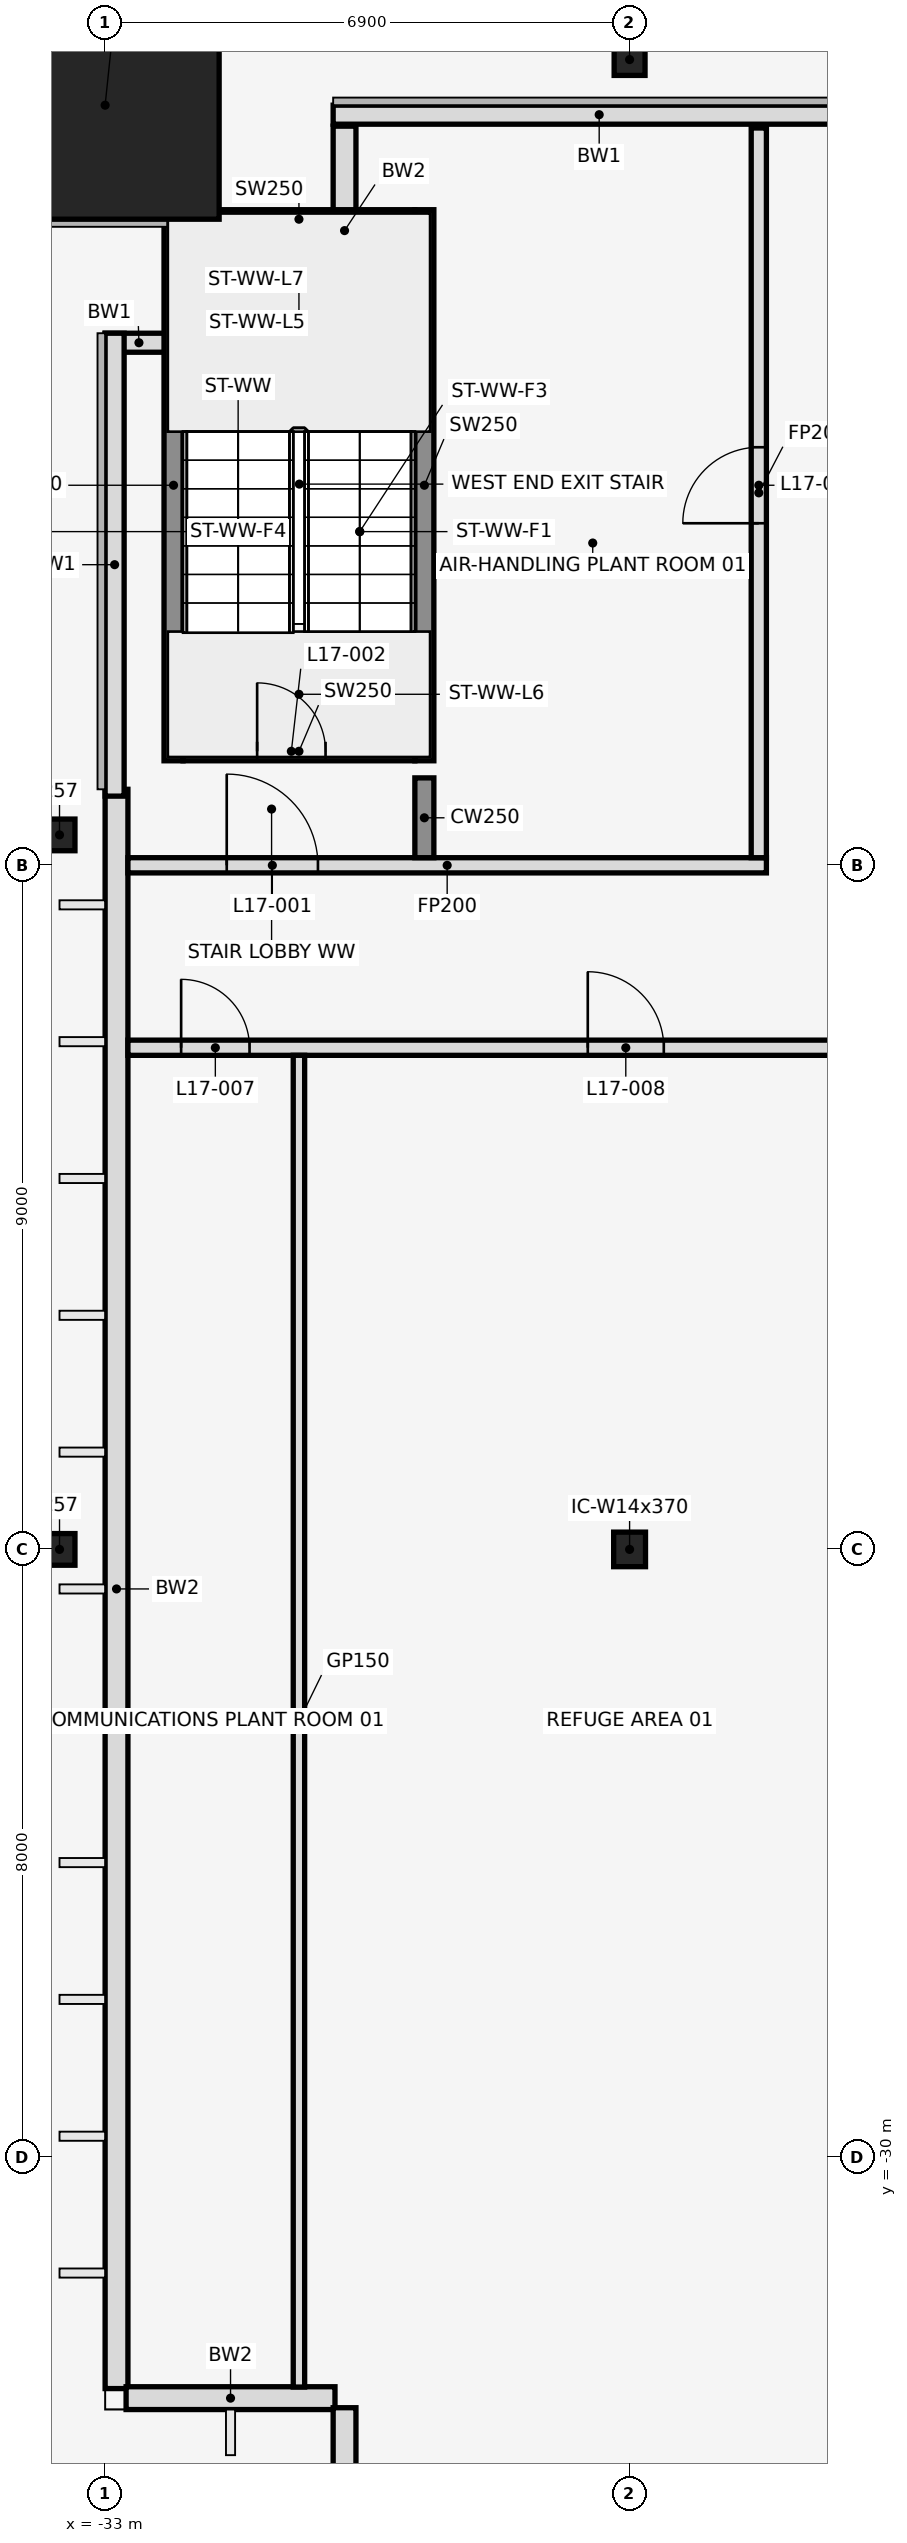
"""IFC4 building model, lengths in metres.
Left out: names, types, materials, properties, quantities, classifications, styles, units other than length and angle.
Written with IfcOpenShell. Run it as: python <this file> out.ifc"""

import sys

from ifc_helpers import new_model, si_unit, direction, frame, frame_2d, origin, origin_2d, place, context, subcontext, project, spatial, rectangle, hollow_rectangle, i_section, extrude, element, fill, save


model = new_model("IFC4")
c1 = context("Model", 3, precision=1e-05, world=origin(), true_north=direction((0.0, 1.0)))
c2 = subcontext(c1, "Body", "Model", "MODEL_VIEW")
j1 = project(units=[si_unit("LENGTHUNIT", "METRE"), si_unit("PLANEANGLEUNIT", "RADIAN")], contexts=[c1])
p1 = place(None, origin())
s1 = spatial("IfcSite", under=j1, at=p1, CompositionType="ELEMENT")
p2 = place(p1, origin())
s2 = spatial("IfcBuilding", under=s1, at=p2, CompositionType="ELEMENT")
p3 = place(p2, frame((0.0, 0.0, 84.5)))
s3 = spatial("IfcBuildingStorey", under=s2, at=p3, CompositionType="ELEMENT", Elevation=84.5)
p4 = place(p3, frame((-33.0, -3.0, 0.0), z_axis=(0.0, 0.0, 1.0), x_axis=(1.0, 0.0, 0.0)))
e1 = element("IfcColumn", 1, at=p4, inside=s3, PredefinedType="COLUMN", context=c2, shape_type="SweptSolid", body=[
    extrude(hollow_rectangle(XDim=3.0, YDim=3.0, WallThickness=0.1, at=origin_2d()), origin(), (0.0, 0.0, 1.0), 5.4),
])
for number, where, z_axis, x_axis in (
    (2, (-26.1, -2.4, 0.0), (0.0, 0.0, 1.0), (1.0, 0.0, 0.0)),
    (3, (-33.6, -12.6, 0.0), (0.0, 0.0, 1.0), (1.0, 0.0, 0.0)),
    (4, (-33.6, -22.0, 0.0), (0.0, 0.0, 1.0), (1.0, 0.0, 0.0)),
):
    element("IfcColumn", number, at=place(p3, frame(where, z_axis=z_axis, x_axis=x_axis)), inside=s3, PredefinedType="COLUMN", context=c2, shape_type="SweptSolid", body=[
        extrude(i_section(OverallWidth=0.406, OverallDepth=0.417, WebThickness=0.03, FlangeThickness=0.048, at=origin_2d()), origin(), (0.0, 0.0, 1.0), 5.4),
    ])
p5 = place(p3, frame((-26.1, -22.0, 0.0), z_axis=(0.0, 0.0, 1.0), x_axis=(1.0, 0.0, 0.0)))
e5 = element("IfcColumn", 5, at=p5, inside=s3, PredefinedType="COLUMN", context=c2, shape_type="SweptSolid", body=[
    extrude(i_section(OverallWidth=0.419, OverallDepth=0.455, WebThickness=0.042, FlangeThickness=0.068, at=origin_2d()), origin(), (0.0, 0.0, 1.0), 5.4),
])
p6 = place(p3, frame((-29.85, -3.276, 0.0), z_axis=(0.0, 0.0, 1.0), x_axis=(0.0, -1.0, 0.0)))
e6 = element("IfcWall", 6, at=p6, inside=s3, PredefinedType="STANDARD", context=c2, shape_type="SweptSolid", body=[
    extrude(rectangle(XDim=2.748, YDim=0.3, at=frame_2d((1.374, 0.0))), origin(), (0.0, 0.0, 1.0), 5.25),
])
p7 = place(p3, frame((-32.85, -12.0, 0.0), z_axis=(0.0, 0.0, 1.0), x_axis=(0.0, -1.0, 0.0)))
e7 = element("IfcWall", 7, at=p7, inside=s3, PredefinedType="STANDARD", context=c2, shape_type="SweptSolid", body=[
    extrude(rectangle(XDim=21.04, YDim=0.3, at=frame_2d((10.52, 0.0))), origin(), (0.0, 0.0, 1.0), 4.338),
])
p8 = place(p3, frame((-32.724, -33.166, 0.0), z_axis=(0.0, 0.0, 1.0), x_axis=(1.0, 0.0, 0.0)))
e8 = element("IfcWall", 8, at=p8, inside=s3, PredefinedType="STANDARD", context=c2, shape_type="SweptSolid", body=[
    extrude(rectangle(XDim=2.748, YDim=0.3, at=frame_2d((1.374, 0.0))), origin(), (0.0, 0.0, 1.0), 4.572),
])
p9 = place(p3, frame((-29.85, -33.292, 0.0), z_axis=(0.0, 0.0, 1.0), x_axis=(0.0, -1.0, 0.0)))
e9 = element("IfcWall", 9, at=p9, inside=s3, PredefinedType="STANDARD", context=c2, shape_type="SweptSolid", body=[
    extrude(rectangle(XDim=2.748, YDim=0.3, at=frame_2d((1.374, 0.0))), origin(), (0.0, 0.0, 1.0), 4.572),
])
p10 = place(p3, frame((-23.0, -3.125, 0.0), z_axis=(0.0, 0.0, 1.0), x_axis=(-1.0, 0.0, 0.0)))
e10 = element("IfcWall", 10, at=p10, inside=s3, PredefinedType="STANDARD", context=c2, shape_type="SweptSolid", body=[
    extrude(rectangle(XDim=7.0, YDim=0.25, at=frame_2d((3.5, 0.0))), origin(), (0.0, 0.0, 1.0), 5.25),
])
p11 = place(p3, frame((-32.11, -6.125, 0.0), z_axis=(0.0, 0.0, 1.0), x_axis=(-1.0, 0.0, 0.0)))
e11 = element("IfcWall", 11, at=p11, inside=s3, PredefinedType="STANDARD", context=c2, shape_type="SweptSolid", body=[
    extrude(rectangle(XDim=0.89, YDim=0.25, at=frame_2d((0.445, 0.0))), origin(), (0.0, 0.0, 1.0), 5.25),
])
p12 = place(p3, frame((-32.875, -6.0, 0.0), z_axis=(0.0, 0.0, 1.0), x_axis=(0.0, -1.0, 0.0)))
e12 = element("IfcWall", 12, at=p12, inside=s3, PredefinedType="STANDARD", context=c2, shape_type="SweptSolid", body=[
    extrude(rectangle(XDim=6.09, YDim=0.25, at=frame_2d((3.045, 0.0))), origin(), (0.0, 0.0, 1.0), 5.25),
])
for number, where, z_axis, x_axis in (
    (13, (-32.1, -11.625, 0.0), (0.0, 0.0, 1.0), (0.0, 1.0, 0.0)),
    (14, (-28.8, -11.625, 0.0), (0.0, 0.0, 1.0), (0.0, 1.0, 0.0)),
):
    element("IfcWall", number, at=place(p3, frame(where, z_axis=z_axis, x_axis=x_axis)), inside=s3, PredefinedType="SHEAR", context=c2, shape_type="SweptSolid", body=[
        extrude(rectangle(XDim=7.25, YDim=0.25, at=frame_2d((3.625, 0.0))), origin(), (0.0, 0.0, 1.0), 5.4),
    ])
p13 = place(p3, frame((-31.975, -11.5, 0.0), z_axis=(0.0, 0.0, 1.0), x_axis=(1.0, 0.0, 0.0)))
e15 = element("IfcWall", 15, at=p13, inside=s3, PredefinedType="SHEAR", context=c2, shape_type="SweptSolid", body=[
    extrude(rectangle(XDim=3.05, YDim=0.25, at=frame_2d((1.525, 0.0))), origin(), (0.0, 0.0, 1.0), 5.4),
])
p14 = place(p13, frame((0.975, 0.0, 0.0)))
e16 = element("IfcOpeningElement", 16, at=p14, cuts=e15, PredefinedType="OPENING", context=c2, shape_type="SweptSolid", body=[
    extrude(rectangle(XDim=0.9, YDim=2.1, at=frame_2d((0.45, 1.05))), frame((0.0, 0.137, 0.0), z_axis=(0.0, -1.0, 0.0), x_axis=(1.0, 0.0, 0.0)), (0.0, 0.0, 1.0), 0.274),
])
p15 = place(p3, frame((-31.975, -4.5, 0.0), z_axis=(0.0, 0.0, 1.0), x_axis=(1.0, 0.0, 0.0)))
e17 = element("IfcWall", 17, at=p15, inside=s3, PredefinedType="SHEAR", context=c2, shape_type="SweptSolid", body=[
    extrude(rectangle(XDim=3.05, YDim=0.25, at=frame_2d((1.525, 0.0))), origin(), (0.0, 0.0, 1.0), 5.4),
])
p16 = place(p3, frame((-32.7, -15.4, 0.0), z_axis=(0.0, 0.0, 1.0), x_axis=(1.0, 0.0, 0.0)))
e18 = element("IfcWall", 18, at=p16, inside=s3, PredefinedType="PARTITIONING", context=c2, shape_type="SweptSolid", body=[
    extrude(rectangle(XDim=65.4, YDim=0.2, at=frame_2d((32.7, 0.0))), origin(), (0.0, 0.0, 1.0), 4.318),
])
p17 = place(p16, frame((0.7, 0.0, 0.0)))
e19 = element("IfcOpeningElement", 19, at=p17, cuts=e18, PredefinedType="OPENING", context=c2, shape_type="SweptSolid", body=[
    extrude(rectangle(XDim=0.9, YDim=2.1, at=frame_2d((0.45, 1.05))), frame((0.0, 0.112, 0.0), z_axis=(0.0, -1.0, 0.0), x_axis=(1.0, 0.0, 0.0)), (0.0, 0.0, 1.0), 0.224),
])
p18 = place(p16, frame((6.05, 0.0, 0.0)))
e20 = element("IfcOpeningElement", 20, at=p18, cuts=e18, PredefinedType="OPENING", context=c2, shape_type="SweptSolid", body=[
    extrude(rectangle(XDim=1.0, YDim=2.1, at=frame_2d((0.5, 1.05))), frame((0.0, 0.112, 0.0), z_axis=(0.0, -1.0, 0.0), x_axis=(1.0, 0.0, 0.0)), (0.0, 0.0, 1.0), 0.224),
])
p19 = place(p16, frame((14.85, 0.0, 0.0)))
e21 = element("IfcOpeningElement", 21, at=p19, cuts=e18, PredefinedType="OPENING", context=c2, shape_type="SweptSolid", body=[
    extrude(rectangle(XDim=1.0, YDim=2.1, at=frame_2d((0.5, 1.05))), frame((0.0, 0.112, 0.0), z_axis=(0.0, -1.0, 0.0), x_axis=(1.0, 0.0, 0.0)), (0.0, 0.0, 1.0), 0.224),
])
p20 = place(p16, frame((23.55, 0.0, 0.0)))
e22 = element("IfcOpeningElement", 22, at=p20, cuts=e18, PredefinedType="OPENING", context=c2, shape_type="SweptSolid", body=[
    extrude(rectangle(XDim=1.0, YDim=2.1, at=frame_2d((0.5, 1.05))), frame((0.0, 0.112, 0.0), z_axis=(0.0, -1.0, 0.0), x_axis=(1.0, 0.0, 0.0)), (0.0, 0.0, 1.0), 0.224),
])
p21 = place(p16, frame((32.15, 0.0, 0.0)))
e23 = element("IfcOpeningElement", 23, at=p21, cuts=e18, PredefinedType="OPENING", context=c2, shape_type="SweptSolid", body=[
    extrude(rectangle(XDim=1.0, YDim=2.1, at=frame_2d((0.5, 1.05))), frame((0.0, 0.112, 0.0), z_axis=(0.0, -1.0, 0.0), x_axis=(1.0, 0.0, 0.0)), (0.0, 0.0, 1.0), 0.224),
])
p22 = place(p16, frame((40.95, 0.0, 0.0)))
e24 = element("IfcOpeningElement", 24, at=p22, cuts=e18, PredefinedType="OPENING", context=c2, shape_type="SweptSolid", body=[
    extrude(rectangle(XDim=1.0, YDim=2.1, at=frame_2d((0.5, 1.05))), frame((0.0, 0.112, 0.0), z_axis=(0.0, -1.0, 0.0), x_axis=(1.0, 0.0, 0.0)), (0.0, 0.0, 1.0), 0.224),
])
p23 = place(p16, frame((49.65, 0.0, 0.0)))
e25 = element("IfcOpeningElement", 25, at=p23, cuts=e18, PredefinedType="OPENING", context=c2, shape_type="SweptSolid", body=[
    extrude(rectangle(XDim=0.9, YDim=2.1, at=frame_2d((0.45, 1.05))), frame((0.0, 0.112, 0.0), z_axis=(0.0, -1.0, 0.0), x_axis=(1.0, 0.0, 0.0)), (0.0, 0.0, 1.0), 0.224),
])
p24 = place(p16, frame((58.35, 0.0, 0.0)))
e26 = element("IfcOpeningElement", 26, at=p24, cuts=e18, PredefinedType="OPENING", context=c2, shape_type="SweptSolid", body=[
    extrude(rectangle(XDim=1.0, YDim=2.1, at=frame_2d((0.5, 1.05))), frame((0.0, 0.112, 0.0), z_axis=(0.0, -1.0, 0.0), x_axis=(1.0, 0.0, 0.0)), (0.0, 0.0, 1.0), 0.224),
])
p25 = place(p16, frame((63.85, 0.0, 0.0)))
e27 = element("IfcOpeningElement", 27, at=p25, cuts=e18, PredefinedType="OPENING", context=c2, shape_type="SweptSolid", body=[
    extrude(rectangle(XDim=0.9, YDim=2.1, at=frame_2d((0.45, 1.05))), frame((0.0, 0.112, 0.0), z_axis=(0.0, -1.0, 0.0), x_axis=(1.0, 0.0, 0.0)), (0.0, 0.0, 1.0), 0.224),
])
p26 = place(p3, frame((-32.7, -13.0, 0.0), z_axis=(0.0, 0.0, 1.0), x_axis=(1.0, 0.0, 0.0)))
e28 = element("IfcWall", 28, at=p26, inside=s3, PredefinedType="PARTITIONING", context=c2, shape_type="SweptSolid", body=[
    extrude(rectangle(XDim=8.4, YDim=0.2, at=frame_2d((4.2, 0.0))), origin(), (0.0, 0.0, 1.0), 4.318),
])
p27 = place(p26, frame((1.3, 0.0, 0.0)))
e29 = element("IfcOpeningElement", 29, at=p27, cuts=e28, PredefinedType="OPENING", context=c2, shape_type="SweptSolid", body=[
    extrude(rectangle(XDim=1.2, YDim=2.1, at=frame_2d((0.6, 1.05))), frame((0.0, 0.112, 0.0), z_axis=(0.0, -1.0, 0.0), x_axis=(1.0, 0.0, 0.0)), (0.0, 0.0, 1.0), 0.224),
])
p28 = place(p3, frame((-30.45, -33.02, 0.0), z_axis=(0.0, 0.0, 1.0), x_axis=(0.0, 1.0, 0.0)))
e30 = element("IfcWall", 30, at=p28, inside=s3, PredefinedType="PARTITIONING", context=c2, shape_type="SweptSolid", body=[
    extrude(rectangle(XDim=17.52, YDim=0.15, at=frame_2d((8.76, 0.0))), origin(), (0.0, 0.0, 1.0), 4.318),
])
p29 = place(p3, frame((-28.8, -12.9, 0.0), z_axis=(0.0, 0.0, 1.0), x_axis=(0.0, 1.0, 0.0)))
e31 = element("IfcWall", 31, at=p29, inside=s3, PredefinedType="SHEAR", context=c2, shape_type="SweptSolid", body=[
    extrude(rectangle(XDim=1.05, YDim=0.25, at=frame_2d((0.525, 0.0))), origin(), (0.0, 0.0, 1.0), 5.4),
])
p30 = place(p3, frame((-24.4, -12.9, 0.0), z_axis=(0.0, 0.0, 1.0), x_axis=(0.0, 1.0, 0.0)))
e32 = element("IfcWall", 32, at=p30, inside=s3, PredefinedType="PARTITIONING", context=c2, shape_type="SweptSolid", body=[
    extrude(rectangle(XDim=9.6, YDim=0.2, at=frame_2d((4.8, 0.0))), origin(), (0.0, 0.0, 1.0), 4.318),
])
p31 = place(p30, frame((4.4, 0.0, 0.0)))
e33 = element("IfcOpeningElement", 33, at=p31, cuts=e32, PredefinedType="OPENING", context=c2, shape_type="SweptSolid", body=[
    extrude(rectangle(XDim=1.0, YDim=2.1, at=frame_2d((0.5, 1.05))), frame((0.0, 0.112, 0.0), z_axis=(0.0, -1.0, 0.0), x_axis=(1.0, 0.0, 0.0)), (0.0, 0.0, 1.0), 0.224),
])
p32 = place(p27, origin())
e34 = element("IfcDoor", 34, at=p32, inside=s3, OperationType="SINGLE_SWING_LEFT", PredefinedType="DOOR", context=c2, shape_type="SweptSolid", body=[
    extrude(rectangle(XDim=1.2, YDim=2.1, at=frame_2d((0.6, 1.05))), frame((0.0, 0.025, 0.0), z_axis=(0.0, -1.0, 0.0), x_axis=(1.0, 0.0, 0.0)), (0.0, 0.0, 1.0), 0.05),
])
fill(e29, e34)
p33 = place(p14, origin())
e35 = element("IfcDoor", 35, at=p33, inside=s3, OperationType="SINGLE_SWING_LEFT", PredefinedType="DOOR", context=c2, shape_type="SweptSolid", body=[
    extrude(rectangle(XDim=0.9, YDim=2.1, at=frame_2d((0.45, 1.05))), frame((0.0, 0.025, 0.0), z_axis=(0.0, -1.0, 0.0), x_axis=(1.0, 0.0, 0.0)), (0.0, 0.0, 1.0), 0.05),
])
fill(e16, e35)
p34 = place(p31, origin())
e36 = element("IfcDoor", 36, at=p34, inside=s3, OperationType="SINGLE_SWING_LEFT", PredefinedType="DOOR", context=c2, shape_type="SweptSolid", body=[
    extrude(rectangle(XDim=1.0, YDim=2.1, at=frame_2d((0.5, 1.05))), frame((0.0, 0.025, 0.0), z_axis=(0.0, -1.0, 0.0), x_axis=(1.0, 0.0, 0.0)), (0.0, 0.0, 1.0), 0.05),
])
fill(e33, e36)
p35 = place(p17, frame((0.9, 0.0, 0.0), z_axis=(0.0, 0.0, 1.0), x_axis=(-1.0, 0.0, 0.0)))
e37 = element("IfcDoor", 37, at=p35, inside=s3, OperationType="SINGLE_SWING_LEFT", PredefinedType="DOOR", context=c2, shape_type="SweptSolid", body=[
    extrude(rectangle(XDim=0.9, YDim=2.1, at=frame_2d((0.45, 1.05))), frame((0.0, 0.025, 0.0), z_axis=(0.0, -1.0, 0.0), x_axis=(1.0, 0.0, 0.0)), (0.0, 0.0, 1.0), 0.05),
])
fill(e19, e37)
p36 = place(p18, frame((1.0, 0.0, 0.0), z_axis=(0.0, 0.0, 1.0), x_axis=(-1.0, 0.0, 0.0)))
e38 = element("IfcDoor", 38, at=p36, inside=s3, OperationType="SINGLE_SWING_RIGHT", PredefinedType="DOOR", context=c2, shape_type="SweptSolid", body=[
    extrude(rectangle(XDim=1.0, YDim=2.1, at=frame_2d((0.5, 1.05))), frame((0.0, 0.025, 0.0), z_axis=(0.0, -1.0, 0.0), x_axis=(1.0, 0.0, 0.0)), (0.0, 0.0, 1.0), 0.05),
])
fill(e20, e38)
save(model, sys.argv[1])
